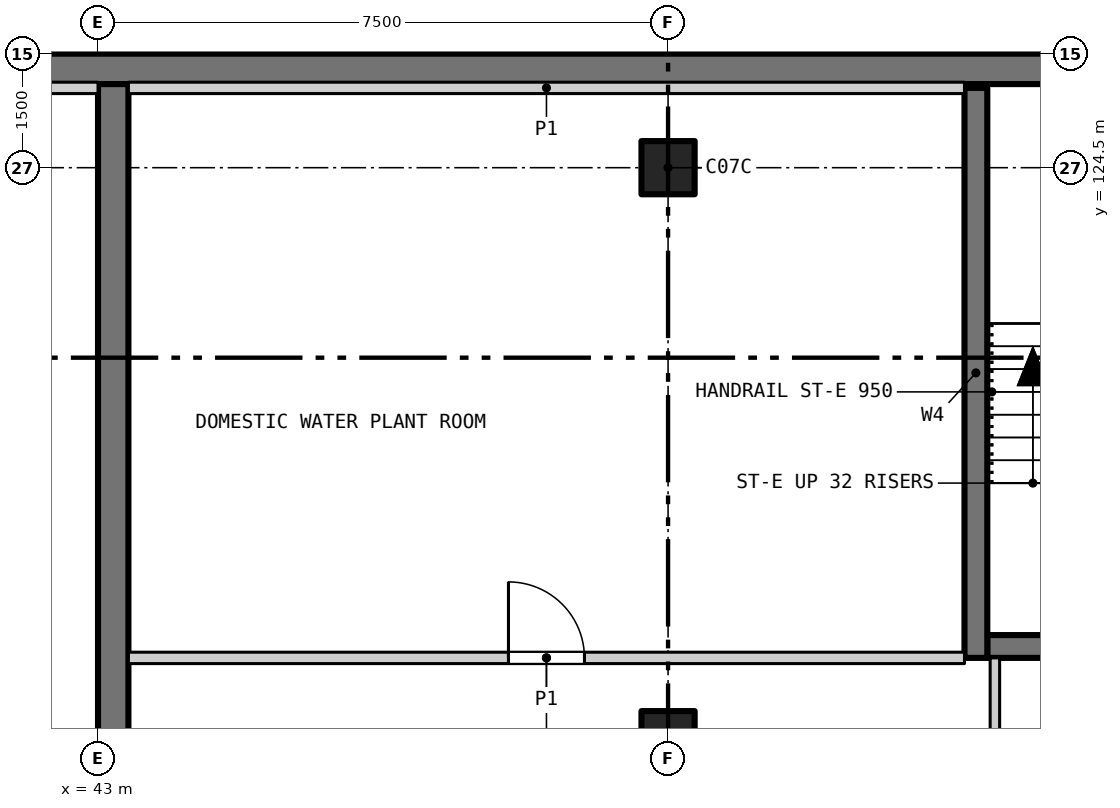
"""IFC4 building model, lengths in metres.
Left out: names, types, materials, properties, quantities, classifications, styles, units other than length and angle.
Written with IfcOpenShell. Run it as: python <this file> out.ifc"""

import sys

from ifc_helpers import new_model, si_unit, direction, frame, frame_2d, origin, origin_2d, place, context, subcontext, project, spatial, rectangle, extrude, element, fill, save


model = new_model("IFC4")
c1 = context("Model", 3, precision=1e-05, world=origin(), true_north=direction((0.0, 1.0)))
c2 = subcontext(c1, "Body", "Model", "MODEL_VIEW")
j1 = project(units=[si_unit("LENGTHUNIT", "METRE"), si_unit("PLANEANGLEUNIT", "RADIAN")], contexts=[c1])
p1 = place(None, origin())
s1 = spatial("IfcSite", under=j1, at=p1, CompositionType="ELEMENT")
p2 = place(p1, origin())
s2 = spatial("IfcBuilding", under=s1, at=p2, CompositionType="ELEMENT")
p3 = place(p2, frame((0.0, 0.0, -10.0)))
s3 = spatial("IfcBuildingStorey", under=s2, at=p3, CompositionType="ELEMENT", Elevation=-10.0)
for number, where, z_axis, x_axis in (
    (1, (50.5, 117.0, -1.4), (0.0, 0.0, 1.0), (1.0, 0.0, 0.0)),
    (2, (50.5, 124.5, -1.4), (0.0, 0.0, 1.0), (1.0, 0.0, 0.0)),
):
    element("IfcColumn", number, at=place(p3, frame(where, z_axis=z_axis, x_axis=x_axis)), inside=s3, PredefinedType="COLUMN", context=c2, shape_type="SweptSolid", body=[
        extrude(rectangle(XDim=0.7, YDim=0.7, at=origin_2d()), origin(), (0.0, 0.0, 1.0), 6.4),
    ])
p4 = place(p3, frame((0.4, 125.8, -1.4), z_axis=(0.0, 0.0, 1.0), x_axis=(1.0, 0.0, 0.0)))
e3 = element("IfcWall", 3, at=p4, inside=s3, PredefinedType="SOLIDWALL", context=c2, shape_type="SweptSolid", body=[
    extrude(rectangle(XDim=57.2, YDim=0.4, at=frame_2d((28.6, 0.0))), origin(), (0.0, 0.0, 1.0), 6.4),
])
p5 = place(p3, frame((43.2, 99.0, -1.4), z_axis=(0.0, 0.0, 1.0), x_axis=(0.0, 1.0, 0.0)))
e4 = element("IfcWall", 4, at=p5, inside=s3, PredefinedType="SHEAR", context=c2, shape_type="SweptSolid", body=[
    extrude(rectangle(XDim=26.6, YDim=0.4, at=frame_2d((13.3, 0.0))), origin(), (0.0, 0.0, 1.0), 6.4),
])
p6 = place(p5, frame((13.95, 0.0, 1.4)))
e5 = element("IfcOpeningElement", 5, at=p6, cuts=e4, PredefinedType="OPENING", context=c2, shape_type="SweptSolid", body=[
    extrude(rectangle(XDim=1.4, YDim=2.4, at=frame_2d((0.7, 1.2))), frame((0.0, 0.21, 0.0), z_axis=(0.0, -1.0, 0.0), x_axis=(1.0, 0.0, 0.0)), (0.0, 0.0, 1.0), 0.42),
])
p7 = place(p3, frame((54.7, 118.2, 0.0), z_axis=(0.0, 0.0, 1.0), x_axis=(1.0, 0.0, 0.0)))
e6 = element("IfcWall", 6, at=p7, inside=s3, PredefinedType="SHEAR", context=c2, shape_type="SweptSolid", body=[
    extrude(rectangle(XDim=3.0, YDim=0.3, at=frame_2d((1.5, 0.0))), origin(), (0.0, 0.0, 1.0), 5.0),
])
p8 = place(p7, frame((0.95, 0.0, 0.0)))
e7 = element("IfcOpeningElement", 7, at=p8, cuts=e6, PredefinedType="OPENING", context=c2, shape_type="SweptSolid", body=[
    extrude(rectangle(XDim=1.1, YDim=2.1, at=frame_2d((0.55, 1.05))), frame((0.0, 0.16, 0.0), z_axis=(0.0, -1.0, 0.0), x_axis=(1.0, 0.0, 0.0)), (0.0, 0.0, 1.0), 0.32),
])
p9 = place(p3, frame((54.55, 118.05, 0.0), z_axis=(0.0, 0.0, 1.0), x_axis=(0.0, 1.0, 0.0)))
e8 = element("IfcWall", 8, at=p9, inside=s3, PredefinedType="SHEAR", context=c2, shape_type="SweptSolid", body=[
    extrude(rectangle(XDim=7.5, YDim=0.3, at=frame_2d((3.75, 0.0))), origin(), (0.0, 0.0, 1.0), 5.0),
])
p10 = place(p3, frame((43.4, 118.05, 0.0), z_axis=(0.0, 0.0, 1.0), x_axis=(1.0, 0.0, 0.0)))
e9 = element("IfcWall", 9, at=p10, inside=s3, PredefinedType="PARTITIONING", context=c2, shape_type="SweptSolid", body=[
    extrude(rectangle(XDim=11.0, YDim=0.15, at=frame_2d((5.5, 0.0))), origin(), (0.0, 0.0, 1.0), 4.75),
])
p11 = place(p10, frame((5.0, 0.0, 0.0)))
e10 = element("IfcOpeningElement", 10, at=p11, cuts=e9, PredefinedType="OPENING", context=c2, shape_type="SweptSolid", body=[
    extrude(rectangle(XDim=1.0, YDim=2.1, at=frame_2d((0.5, 1.05))), frame((0.0, 0.085, 0.0), z_axis=(0.0, -1.0, 0.0), x_axis=(1.0, 0.0, 0.0)), (0.0, 0.0, 1.0), 0.17),
])
p12 = place(p3, frame((28.97, 125.55, 0.0), z_axis=(0.0, 0.0, 1.0), x_axis=(1.0, 0.0, 0.0)))
e11 = element("IfcWall", 11, at=p12, inside=s3, PredefinedType="PARTITIONING", context=c2, shape_type="SweptSolid", body=[
    extrude(rectangle(XDim=14.03, YDim=0.15, at=frame_2d((7.015, 0.0))), origin(), (0.0, 0.0, 1.0), 4.75),
])
p13 = place(p3, frame((43.4, 125.55, 0.0), z_axis=(0.0, 0.0, 1.0), x_axis=(1.0, 0.0, 0.0)))
e12 = element("IfcWall", 12, at=p13, inside=s3, PredefinedType="PARTITIONING", context=c2, shape_type="SweptSolid", body=[
    extrude(rectangle(XDim=11.0, YDim=0.15, at=frame_2d((5.5, 0.0))), origin(), (0.0, 0.0, 1.0), 4.75),
])
p14 = place(p3, frame((54.8, 112.363, 0.0), z_axis=(0.0, 0.0, 1.0), x_axis=(0.0, 1.0, 0.0)))
e13 = element("IfcWall", 13, at=p14, inside=s3, PredefinedType="PARTITIONING", context=c2, shape_type="SweptSolid", body=[
    extrude(rectangle(XDim=5.688, YDim=0.125, at=frame_2d((2.844, 0.0))), origin(), (0.0, 0.0, 1.0), 4.75),
])
p15 = place(p14, frame((2.3, 0.0, 0.0)))
e14 = element("IfcOpeningElement", 14, at=p15, cuts=e13, PredefinedType="OPENING", context=c2, shape_type="SweptSolid", body=[
    extrude(rectangle(XDim=1.1, YDim=2.1, at=frame_2d((0.55, 1.05))), frame((0.0, 0.073, 0.0), z_axis=(0.0, -1.0, 0.0), x_axis=(1.0, 0.0, 0.0)), (0.0, 0.0, 1.0), 0.145),
])
p16 = place(p11, origin())
e15 = element("IfcDoor", 15, at=p16, inside=s3, OperationType="SINGLE_SWING_LEFT", PredefinedType="DOOR", context=c2, shape_type="SweptSolid", body=[
    extrude(rectangle(XDim=1.0, YDim=2.1, at=frame_2d((0.5, 1.05))), frame((0.0, 0.025, 0.0), z_axis=(0.0, -1.0, 0.0), x_axis=(1.0, 0.0, 0.0)), (0.0, 0.0, 1.0), 0.05),
])
fill(e10, e15)
save(model, sys.argv[1])
